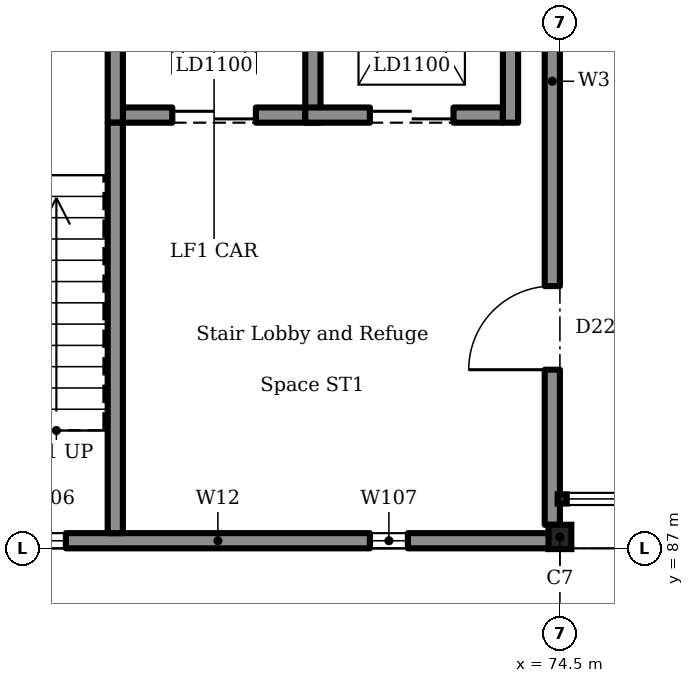
"""IFC4 building model, lengths in metres.
Left out: names, types, materials, properties, quantities, classifications, styles, units other than length and angle.
Written with IfcOpenShell. Run it as: python <this file> out.ifc"""

import sys

from ifc_helpers import new_model, si_unit, direction, frame, frame_2d, origin, origin_2d, place, context, subcontext, project, spatial, rectangle, i_section, extrude, element, fill, save


model = new_model("IFC4")
c1 = context("Model", 3, precision=1e-05, world=origin(), true_north=direction((0.0, 1.0)))
c2 = subcontext(c1, "Body", "Model", "MODEL_VIEW")
j1 = project(units=[si_unit("LENGTHUNIT", "METRE"), si_unit("PLANEANGLEUNIT", "RADIAN")], contexts=[c1])
p1 = place(None, origin())
s1 = spatial("IfcSite", under=j1, at=p1, CompositionType="ELEMENT")
p2 = place(p1, origin())
s2 = spatial("IfcBuilding", under=s1, at=p2, CompositionType="ELEMENT")
p3 = place(p2, frame((0.0, 0.0, 14.4)))
s3 = spatial("IfcBuildingStorey", under=s2, at=p3, CompositionType="ELEMENT", Elevation=14.4)
p4 = place(p3, frame((68.75, 92.7, 0.0), z_axis=(0.0, 0.0, 1.0), x_axis=(1.0, 0.0, 0.0)))
e1 = element("IfcWall", 1, at=p4, inside=s3, PredefinedType="SOLIDWALL", context=c2, shape_type="SweptSolid", body=[
    extrude(rectangle(XDim=2.4, YDim=0.2, at=frame_2d((1.2, 0.0))), origin(), (0.0, 0.0, 1.0), 4.5),
])
p5 = place(p4, frame((0.65, 0.0, 0.0)))
e2 = element("IfcOpeningElement", 2, at=p5, cuts=e1, PredefinedType="OPENING", context=c2, shape_type="SweptSolid", body=[
    extrude(rectangle(XDim=1.1, YDim=2.1, at=frame_2d((0.55, 1.05))), frame((0.0, 0.11, 0.0), z_axis=(0.0, -1.0, 0.0), x_axis=(1.0, 0.0, 0.0)), (0.0, 0.0, 1.0), 0.22),
])
for number, where, z_axis, x_axis in (
    (3, (68.65, 92.6, 0.0), (0.0, 0.0, 1.0), (0.0, 1.0, 0.0)),
    (4, (71.25, 92.6, 0.0), (0.0, 0.0, 1.0), (0.0, 1.0, 0.0)),
):
    element("IfcWall", number, at=place(p3, frame(where, z_axis=z_axis, x_axis=x_axis)), inside=s3, PredefinedType="SOLIDWALL", context=c2, shape_type="SweptSolid", body=[
        extrude(rectangle(XDim=3.4, YDim=0.2, at=frame_2d((1.7, 0.0))), origin(), (0.0, 0.0, 1.0), 4.5),
    ])
p6 = place(p3, frame((71.15, 92.7, 0.0), z_axis=(0.0, 0.0, 1.0), x_axis=(1.0, 0.0, 0.0)))
e5 = element("IfcWall", 5, at=p6, inside=s3, PredefinedType="SOLIDWALL", context=c2, shape_type="SweptSolid", body=[
    extrude(rectangle(XDim=2.6, YDim=0.2, at=frame_2d((1.3, 0.0))), origin(), (0.0, 0.0, 1.0), 4.5),
])
p7 = place(p6, frame((0.85, 0.0, 0.0)))
e6 = element("IfcOpeningElement", 6, at=p7, cuts=e5, PredefinedType="OPENING", context=c2, shape_type="SweptSolid", body=[
    extrude(rectangle(XDim=1.1, YDim=2.1, at=frame_2d((0.55, 1.05))), frame((0.0, 0.11, 0.0), z_axis=(0.0, -1.0, 0.0), x_axis=(1.0, 0.0, 0.0)), (0.0, 0.0, 1.0), 0.22),
])
p8 = place(p3, frame((73.85, 92.6, 0.0), z_axis=(0.0, 0.0, 1.0), x_axis=(0.0, 1.0, 0.0)))
e7 = element("IfcWall", 7, at=p8, inside=s3, PredefinedType="SOLIDWALL", context=c2, shape_type="SweptSolid", body=[
    extrude(rectangle(XDim=3.4, YDim=0.2, at=frame_2d((1.7, 0.0))), origin(), (0.0, 0.0, 1.0), 4.5),
])
p9 = place(p3, frame((74.5, 87.15, 0.0), z_axis=(0.0, 0.0, 1.0), x_axis=(1.0, 0.0, 0.0)))
e8 = element("IfcColumn", 8, at=p9, inside=s3, PredefinedType="COLUMN", context=c2, shape_type="SweptSolid", body=[
    extrude(i_section(OverallWidth=0.3, OverallDepth=0.32, WebThickness=0.011, FlangeThickness=0.021, FilletRadius=0.027, at=origin_2d()), origin(), (0.0, 0.0, 1.0), 4.5),
])
p10 = place(p3, frame((74.4, 87.31, 0.0), z_axis=(0.0, 0.0, 1.0), x_axis=(0.0, 1.0, 0.0)))
e9 = element("IfcWall", 9, at=p10, inside=s3, PredefinedType="SOLIDWALL", context=c2, shape_type="SweptSolid", body=[
    extrude(rectangle(XDim=8.53, YDim=0.2, at=frame_2d((4.265, 0.0))), origin(), (0.0, 0.0, 1.0), 4.35),
])
p11 = place(p10, frame((2.04, 0.0, 0.0)))
e10 = element("IfcOpeningElement", 10, at=p11, cuts=e9, PredefinedType="OPENING", context=c2, shape_type="SweptSolid", body=[
    extrude(rectangle(XDim=1.1, YDim=2.1, at=frame_2d((0.55, 1.05))), frame((0.0, 0.11, 0.0), z_axis=(0.0, -1.0, 0.0), x_axis=(1.0, 0.0, 0.0)), (0.0, 0.0, 1.0), 0.22),
])
p12 = place(p3, frame((65.511, 87.1, 0.0), z_axis=(0.0, 0.0, 1.0), x_axis=(1.0, 0.0, 0.0)))
e11 = element("IfcWall", 11, at=p12, inside=s3, PredefinedType="SOLIDWALL", context=c2, shape_type="SweptSolid", body=[
    extrude(rectangle(XDim=8.978, YDim=0.2, at=frame_2d((4.489, 0.0))), origin(), (0.0, 0.0, 1.0), 4.35),
])
p13 = place(p12, frame((1.989, 0.0, 2.9)))
e12 = element("IfcOpeningElement", 12, at=p13, cuts=e11, PredefinedType="OPENING", context=c2, shape_type="SweptSolid", body=[
    extrude(rectangle(XDim=0.5, YDim=1.2, at=frame_2d((0.25, 0.6))), frame((0.0, 0.11, 0.0), z_axis=(0.0, -1.0, 0.0), x_axis=(1.0, 0.0, 0.0)), (0.0, 0.0, 1.0), 0.22),
])
p14 = place(p12, frame((6.489, 0.0, 2.9)))
e13 = element("IfcOpeningElement", 13, at=p14, cuts=e11, PredefinedType="OPENING", context=c2, shape_type="SweptSolid", body=[
    extrude(rectangle(XDim=0.5, YDim=1.2, at=frame_2d((0.25, 0.6))), frame((0.0, 0.11, 0.0), z_axis=(0.0, -1.0, 0.0), x_axis=(1.0, 0.0, 0.0)), (0.0, 0.0, 1.0), 0.22),
])
p15 = place(p3, frame((68.65, 87.2, 0.0), z_axis=(0.0, 0.0, 1.0), x_axis=(0.0, 1.0, 0.0)))
e14 = element("IfcWall", 14, at=p15, inside=s3, PredefinedType="SOLIDWALL", context=c2, shape_type="SweptSolid", body=[
    extrude(rectangle(XDim=5.4, YDim=0.2, at=frame_2d((2.7, 0.0))), origin(), (0.0, 0.0, 1.0), 4.35),
])
p16 = place(p5, origin())
e15 = element("IfcDoor", 15, at=p16, inside=s3, OperationType="SLIDING_TO_LEFT", PredefinedType="DOOR", context=c2, shape_type="SweptSolid", body=[
    extrude(rectangle(XDim=1.1, YDim=2.1, at=frame_2d((0.55, 1.05))), frame((0.0, 0.025, 0.0), z_axis=(0.0, -1.0, 0.0), x_axis=(1.0, 0.0, 0.0)), (0.0, 0.0, 1.0), 0.05),
])
fill(e2, e15)
p17 = place(p7, origin())
e16 = element("IfcDoor", 16, at=p17, inside=s3, OperationType="SLIDING_TO_LEFT", PredefinedType="DOOR", context=c2, shape_type="SweptSolid", body=[
    extrude(rectangle(XDim=1.1, YDim=2.1, at=frame_2d((0.55, 1.05))), frame((0.0, 0.025, 0.0), z_axis=(0.0, -1.0, 0.0), x_axis=(1.0, 0.0, 0.0)), (0.0, 0.0, 1.0), 0.05),
])
fill(e6, e16)
p18 = place(p13, origin())
e17 = element("IfcWindow", 17, at=p18, inside=s3, PartitioningType="SINGLE_PANEL", PredefinedType="WINDOW", context=c2, shape_type="SweptSolid", body=[
    extrude(rectangle(XDim=0.5, YDim=1.2, at=frame_2d((0.25, 0.6))), frame((0.0, 0.03, 0.0), z_axis=(0.0, -1.0, 0.0), x_axis=(1.0, 0.0, 0.0)), (0.0, 0.0, 1.0), 0.06),
])
fill(e12, e17)
p19 = place(p14, origin())
e18 = element("IfcWindow", 18, at=p19, inside=s3, PartitioningType="SINGLE_PANEL", PredefinedType="WINDOW", context=c2, shape_type="SweptSolid", body=[
    extrude(rectangle(XDim=0.5, YDim=1.2, at=frame_2d((0.25, 0.6))), frame((0.0, 0.03, 0.0), z_axis=(0.0, -1.0, 0.0), x_axis=(1.0, 0.0, 0.0)), (0.0, 0.0, 1.0), 0.06),
])
fill(e13, e18)
p20 = place(p11, origin())
e19 = element("IfcDoor", 19, at=p20, inside=s3, OperationType="SINGLE_SWING_RIGHT", PredefinedType="DOOR", context=c2, shape_type="SweptSolid", body=[
    extrude(rectangle(XDim=1.1, YDim=2.1, at=frame_2d((0.55, 1.05))), frame((0.0, 0.025, 0.0), z_axis=(0.0, -1.0, 0.0), x_axis=(1.0, 0.0, 0.0)), (0.0, 0.0, 1.0), 0.05),
])
fill(e10, e19)
save(model, sys.argv[1])
